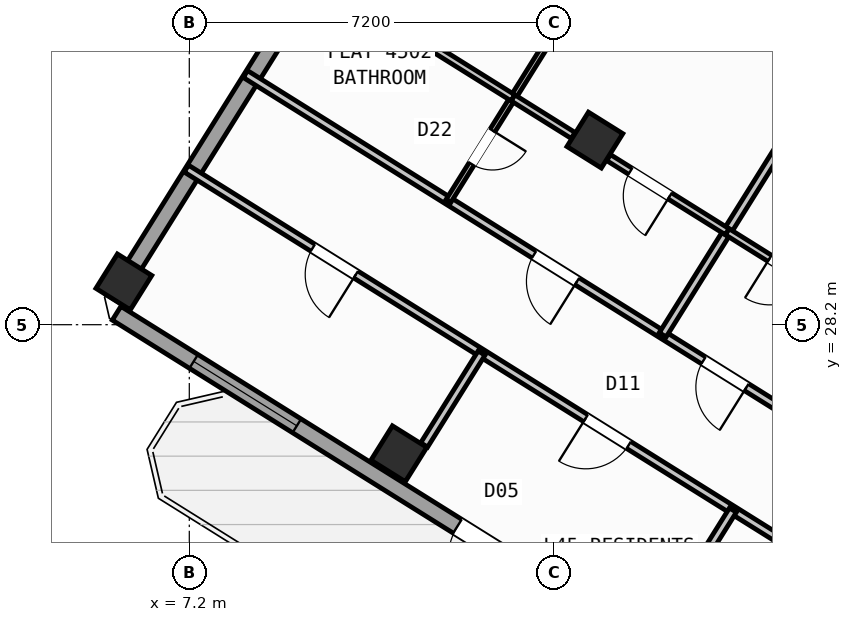
"""IFC4 building model, lengths in metres.
Left out: names, types, materials, properties, quantities, classifications, styles, units other than length and angle.
Written with IfcOpenShell. Run it as: python <this file> out.ifc"""

import sys

from ifc_helpers import new_model, si_unit, direction, frame, frame_2d, origin, origin_2d, place, context, subcontext, project, spatial, rectangle, hollow_rectangle, extrude, source, transform, mapped, element, fill, save


model = new_model("IFC4")
c1 = context("Model", 3, precision=1e-05, world=origin(), true_north=direction((0.0, 1.0)))
c2 = subcontext(c1, "Body", "Model", "MODEL_VIEW")
j1 = project(units=[si_unit("LENGTHUNIT", "METRE"), si_unit("PLANEANGLEUNIT", "RADIAN")], contexts=[c1])
p1 = place(None, origin())
s1 = spatial("IfcSite", under=j1, at=p1, CompositionType="ELEMENT")
p2 = place(p1, origin())
s2 = spatial("IfcBuilding", under=s1, at=p2, CompositionType="ELEMENT")
p3 = place(p2, frame((0.0, 0.0, 179.4)))
s3 = spatial("IfcBuildingStorey", under=s2, at=p3, CompositionType="ELEMENT", Elevation=179.4)
m1 = source(origin(), c2, "Body", "SweptSolid", [
    extrude(hollow_rectangle(XDim=0.8, YDim=0.8, WallThickness=0.032, at=origin_2d()), origin(), (0.0, 0.0, 1.0), 4.8),
])
for number, where, z_axis, x_axis in (
    (1, (15.205, 31.844, 0.0), (0.0, 0.0, 1.0), (-0.848, 0.53, 0.0)),
    (2, (11.336, 25.653, 0.0), (0.0, 0.0, 1.0), (-0.848, 0.53, 0.0)),
    (3, (5.909, 29.044, 0.0), (0.0, 0.0, 1.0), (-0.848, 0.53, 0.0)),
):
    element("IfcColumn", number, at=place(p3, frame(where, z_axis=z_axis, x_axis=x_axis)), inside=s3, PredefinedType="COLUMN", context=c2, shape_type="MappedRepresentation", body=[
        mapped(m1, transform((0.0, 0.0, 0.0), scale=1.0)),
    ])
p4 = place(p3, frame((31.76, 12.183, 0.0), z_axis=(0.0, 0.0, 1.0), x_axis=(-0.848047074256, 0.529920899612, 0.0)))
e4 = element("IfcWall", 4, at=p4, inside=s3, PredefinedType="STANDARD", context=c2, shape_type="SweptSolid", body=[
    extrude(rectangle(XDim=30.652, YDim=0.32, at=frame_2d((15.326, 0.0))), origin(), (0.0, 0.0, 1.0), 4.55),
])
p5 = place(p4, frame((21.52, 0.0, 0.0)))
e5 = element("IfcOpeningElement", 5, at=p5, cuts=e4, PredefinedType="OPENING", context=c2, shape_type="SweptSolid", body=[
    extrude(rectangle(XDim=1.2, YDim=2.15, at=frame_2d((0.6, 1.075))), frame((0.0, 0.17, 0.0), z_axis=(0.0, -1.0, 0.0), x_axis=(1.0, 0.0, 0.0)), (0.0, 0.0, 1.0), 0.34),
])
p6 = place(p4, frame((14.878, 0.0, 0.0)))
e6 = element("IfcOpeningElement", 6, at=p6, cuts=e4, PredefinedType="OPENING", context=c2, shape_type="SweptSolid", body=[
    extrude(rectangle(XDim=1.5, YDim=2.25, at=frame_2d((0.75, 1.125))), frame((0.0, 0.17, 0.0), z_axis=(0.0, -1.0, 0.0), x_axis=(1.0, 0.0, 0.0)), (0.0, 0.0, 1.0), 0.34),
])
p7 = place(p4, frame((1.865, 0.0, 0.75)))
e7 = element("IfcOpeningElement", 7, at=p7, cuts=e4, PredefinedType="OPENING", context=c2, shape_type="SweptSolid", body=[
    extrude(rectangle(XDim=2.4, YDim=1.6, at=frame_2d((1.2, 0.8))), frame((0.0, 0.17, 0.0), z_axis=(0.0, -1.0, 0.0), x_axis=(1.0, 0.0, 0.0)), (0.0, 0.0, 1.0), 0.34),
])
p8 = place(p4, frame((7.094, 0.0, 0.75)))
e8 = element("IfcOpeningElement", 8, at=p8, cuts=e4, PredefinedType="OPENING", context=c2, shape_type="SweptSolid", body=[
    extrude(rectangle(XDim=2.4, YDim=1.6, at=frame_2d((1.2, 0.8))), frame((0.0, 0.17, 0.0), z_axis=(0.0, -1.0, 0.0), x_axis=(1.0, 0.0, 0.0)), (0.0, 0.0, 1.0), 0.34),
])
p9 = place(p4, frame((19.404, 0.0, 0.95)))
e9 = element("IfcOpeningElement", 9, at=p9, cuts=e4, PredefinedType="OPENING", context=c2, shape_type="SweptSolid", body=[
    extrude(rectangle(XDim=1.2, YDim=1.4, at=frame_2d((0.6, 0.7))), frame((0.0, 0.17, 0.0), z_axis=(0.0, -1.0, 0.0), x_axis=(1.0, 0.0, 0.0)), (0.0, 0.0, 1.0), 0.34),
])
p10 = place(p4, frame((26.458, 0.0, 0.75)))
e10 = element("IfcOpeningElement", 10, at=p10, cuts=e4, PredefinedType="OPENING", context=c2, shape_type="SweptSolid", body=[
    extrude(rectangle(XDim=2.4, YDim=1.6, at=frame_2d((1.2, 0.8))), frame((0.0, 0.17, 0.0), z_axis=(0.0, -1.0, 0.0), x_axis=(1.0, 0.0, 0.0)), (0.0, 0.0, 1.0), 0.34),
])
p11 = place(p3, frame((5.7, 28.71, 0.0), z_axis=(0.0, 0.0, 1.0), x_axis=(0.529923711467, 0.8480453172, 0.0)))
e11 = element("IfcWall", 11, at=p11, inside=s3, PredefinedType="STANDARD", context=c2, shape_type="SweptSolid", body=[
    extrude(rectangle(XDim=21.587, YDim=0.32, at=frame_2d((10.794, 0.0))), origin(), (0.0, 0.0, 1.0), 4.025),
])
p12 = place(p11, frame((10.127, 0.0, 0.75)))
e12 = element("IfcOpeningElement", 12, at=p12, cuts=e11, PredefinedType="OPENING", context=c2, shape_type="SweptSolid", body=[
    extrude(rectangle(XDim=2.4, YDim=1.6, at=frame_2d((1.2, 0.8))), frame((0.0, 0.17, 0.0), z_axis=(0.0, -1.0, 0.0), x_axis=(1.0, 0.0, 0.0)), (0.0, 0.0, 1.0), 0.34),
])
p13 = place(p3, frame((17.424, 47.083, 0.0), z_axis=(0.0, 0.0, 1.0), x_axis=(0.848049927979, -0.529916332693, 0.0)))
e13 = element("IfcWall", 13, at=p13, inside=s3, PredefinedType="STANDARD", context=c2, shape_type="SweptSolid", body=[
    extrude(rectangle(XDim=29.223, YDim=0.32, at=frame_2d((14.612, 0.0))), origin(), (0.0, 0.0, 1.0), 4.55),
])
p14 = place(p13, frame((2.745, 0.0, 0.0)))
e14 = element("IfcOpeningElement", 14, at=p14, cuts=e13, PredefinedType="OPENING", context=c2, shape_type="SweptSolid", body=[
    extrude(rectangle(XDim=1.05, YDim=2.15, at=frame_2d((0.525, 1.075))), frame((0.0, 0.17, 0.0), z_axis=(0.0, -1.0, 0.0), x_axis=(1.0, 0.0, 0.0)), (0.0, 0.0, 1.0), 0.34),
])
p15 = place(p13, frame((21.926, 0.0, 0.75)))
e15 = element("IfcOpeningElement", 15, at=p15, cuts=e13, PredefinedType="OPENING", context=c2, shape_type="SweptSolid", body=[
    extrude(rectangle(XDim=2.4, YDim=1.6, at=frame_2d((1.2, 0.8))), frame((0.0, 0.17, 0.0), z_axis=(0.0, -1.0, 0.0), x_axis=(1.0, 0.0, 0.0)), (0.0, 0.0, 1.0), 0.34),
])
p16 = place(p13, frame((26.934, 0.0, 0.95)))
e16 = element("IfcOpeningElement", 16, at=p16, cuts=e13, PredefinedType="OPENING", context=c2, shape_type="SweptSolid", body=[
    extrude(rectangle(XDim=1.2, YDim=1.4, at=frame_2d((0.6, 0.7))), frame((0.0, 0.17, 0.0), z_axis=(0.0, -1.0, 0.0), x_axis=(1.0, 0.0, 0.0)), (0.0, 0.0, 1.0), 0.34),
])
p17 = place(p13, frame((10.057, 0.0, 1.0)))
e17 = element("IfcOpeningElement", 17, at=p17, cuts=e13, PredefinedType="OPENING", context=c2, shape_type="SweptSolid", body=[
    extrude(rectangle(XDim=0.65, YDim=1.15, at=frame_2d((0.325, 0.575))), frame((0.0, 0.17, 0.0), z_axis=(0.0, -1.0, 0.0), x_axis=(1.0, 0.0, 0.0)), (0.0, 0.0, 1.0), 0.34),
])
p18 = place(p13, frame((14.636, 0.0, 1.0)))
e18 = element("IfcOpeningElement", 18, at=p18, cuts=e13, PredefinedType="OPENING", context=c2, shape_type="SweptSolid", body=[
    extrude(rectangle(XDim=0.9, YDim=1.25, at=frame_2d((0.45, 0.625))), frame((0.0, 0.17, 0.0), z_axis=(0.0, -1.0, 0.0), x_axis=(1.0, 0.0, 0.0)), (0.0, 0.0, 1.0), 0.34),
])
p19 = place(p13, frame((8.052, 0.0, 1.0)))
e19 = element("IfcOpeningElement", 19, at=p19, cuts=e13, PredefinedType="OPENING", context=c2, shape_type="SweptSolid", body=[
    extrude(rectangle(XDim=0.65, YDim=1.15, at=frame_2d((0.325, 0.575))), frame((0.0, 0.17, 0.0), z_axis=(0.0, -1.0, 0.0), x_axis=(1.0, 0.0, 0.0)), (0.0, 0.0, 1.0), 0.34),
])
p20 = place(p3, frame((22.495, 24.281, 0.0), z_axis=(0.0, 0.0, 1.0), x_axis=(-0.848052408131, 0.529912363569, 0.0)))
e20 = element("IfcWall", 20, at=p20, inside=s3, PredefinedType="PARTITIONING", context=c2, shape_type="SweptSolid", body=[
    extrude(rectangle(XDim=16.73, YDim=0.16, at=frame_2d((8.365, 0.0))), origin(), (0.0, 0.0, 1.0), 4.54),
])
p21 = place(p20, frame((5.068, 0.0, 0.0)))
e21 = element("IfcOpeningElement", 21, at=p21, cuts=e20, PredefinedType="OPENING", context=c2, shape_type="SweptSolid", body=[
    extrude(rectangle(XDim=1.0, YDim=2.1, at=frame_2d((0.5, 1.05))), frame((0.0, 0.09, 0.0), z_axis=(0.0, -1.0, 0.0), x_axis=(1.0, 0.0, 0.0)), (0.0, 0.0, 1.0), 0.18),
])
p22 = place(p20, frame((9.011, 0.0, 0.0)))
e22 = element("IfcOpeningElement", 22, at=p22, cuts=e20, PredefinedType="OPENING", context=c2, shape_type="SweptSolid", body=[
    extrude(rectangle(XDim=1.0, YDim=2.1, at=frame_2d((0.5, 1.05))), frame((0.0, 0.09, 0.0), z_axis=(0.0, -1.0, 0.0), x_axis=(1.0, 0.0, 0.0)), (0.0, 0.0, 1.0), 0.18),
])
p23 = place(p3, frame((21.329, 22.416, 0.0), z_axis=(0.0, 0.0, 1.0), x_axis=(-0.848052408131, 0.529912363569, 0.0)))
e23 = element("IfcWall", 23, at=p23, inside=s3, PredefinedType="PARTITIONING", context=c2, shape_type="SweptSolid", body=[
    extrude(rectangle(XDim=16.73, YDim=0.16, at=frame_2d((8.365, 0.0))), origin(), (0.0, 0.0, 1.0), 4.54),
])
p24 = place(p23, frame((1.505, 0.0, 0.0)))
e24 = element("IfcOpeningElement", 24, at=p24, cuts=e23, PredefinedType="OPENING", context=c2, shape_type="SweptSolid", body=[
    extrude(rectangle(XDim=1.0, YDim=2.1, at=frame_2d((0.5, 1.05))), frame((0.0, 0.09, 0.0), z_axis=(0.0, -1.0, 0.0), x_axis=(1.0, 0.0, 0.0)), (0.0, 0.0, 1.0), 0.18),
])
p25 = place(p23, frame((6.435, 0.0, 0.0)))
e25 = element("IfcOpeningElement", 25, at=p25, cuts=e23, PredefinedType="OPENING", context=c2, shape_type="SweptSolid", body=[
    extrude(rectangle(XDim=1.0, YDim=2.1, at=frame_2d((0.5, 1.05))), frame((0.0, 0.09, 0.0), z_axis=(0.0, -1.0, 0.0), x_axis=(1.0, 0.0, 0.0)), (0.0, 0.0, 1.0), 0.18),
])
p26 = place(p23, frame((12.784, 0.0, 0.0)))
e26 = element("IfcOpeningElement", 26, at=p26, cuts=e23, PredefinedType="OPENING", context=c2, shape_type="SweptSolid", body=[
    extrude(rectangle(XDim=1.0, YDim=2.1, at=frame_2d((0.5, 1.05))), frame((0.0, 0.09, 0.0), z_axis=(0.0, -1.0, 0.0), x_axis=(1.0, 0.0, 0.0)), (0.0, 0.0, 1.0), 0.18),
])
p27 = place(p3, frame((17.928, 24.541, 0.0), z_axis=(0.0, 0.0, 1.0), x_axis=(-0.529844966244, -0.848094518167, 0.0)))
e27 = element("IfcWall", 27, at=p27, inside=s3, PredefinedType="PARTITIONING", context=c2, shape_type="SweptSolid", body=[
    extrude(rectangle(XDim=2.138, YDim=0.16, at=frame_2d((1.069, 0.0))), origin(), (0.0, 0.0, 1.0), 4.025),
])
p28 = place(p3, frame((12.968, 27.64, 0.0), z_axis=(0.0, 0.0, 1.0), x_axis=(-0.52989628283, -0.848062456098, 0.0)))
e28 = element("IfcWall", 28, at=p28, inside=s3, PredefinedType="PARTITIONING", context=c2, shape_type="SweptSolid", body=[
    extrude(rectangle(XDim=2.138, YDim=0.16, at=frame_2d((1.069, 0.0))), origin(), (0.0, 0.0, 1.0), 4.54),
])
p29 = place(p3, frame((25.351, 42.095, 0.0), z_axis=(0.0, 0.0, 1.0), x_axis=(-0.529926315456, -0.848043690023, 0.0)))
e29 = element("IfcWall", 29, at=p29, inside=s3, PredefinedType="PARTITIONING", context=c2, shape_type="SweptSolid", body=[
    extrude(rectangle(XDim=16.62, YDim=0.16, at=frame_2d((8.31, 0.0))), origin(), (0.0, 0.0, 1.0), 4.54),
])
p30 = place(p3, frame((20.203, 28.543, 0.0), z_axis=(0.0, 0.0, 1.0), x_axis=(-0.848066485351, 0.529889834233, 0.0)))
e30 = element("IfcWall", 30, at=p30, inside=s3, PredefinedType="PLUMBINGWALL", context=c2, shape_type="SweptSolid", body=[
    extrude(rectangle(XDim=2.816, YDim=0.14, at=frame_2d((1.408, 0.0))), origin(), (0.0, 0.0, 1.0), 4.025),
])
p31 = place(p30, frame((0.906, 0.0, 0.0)))
e31 = element("IfcOpeningElement", 31, at=p31, cuts=e30, PredefinedType="OPENING", context=c2, shape_type="SweptSolid", body=[
    extrude(rectangle(XDim=0.92, YDim=2.08, at=frame_2d((0.46, 1.04))), frame((0.0, 0.08, 0.0), z_axis=(0.0, -1.0, 0.0), x_axis=(1.0, 0.0, 0.0)), (0.0, 0.0, 1.0), 0.16),
])
p32 = place(p3, frame((21.202, 44.864, 0.0), z_axis=(0.0, 0.0, 1.0), x_axis=(-0.529920421309, -0.848047373134, 0.0)))
e32 = element("IfcWall", 32, at=p32, inside=s3, PredefinedType="PARTITIONING", context=c2, shape_type="SweptSolid", body=[
    extrude(rectangle(XDim=16.77, YDim=0.11, at=frame_2d((8.385, 0.0))), origin(), (0.0, 0.0, 1.0), 4.54),
])
p33 = place(p32, frame((15.13, 0.0, 0.0)))
e33 = element("IfcOpeningElement", 33, at=p33, cuts=e32, PredefinedType="OPENING", context=c2, shape_type="SweptSolid", body=[
    extrude(rectangle(XDim=0.78, YDim=2.05, at=frame_2d((0.39, 1.025))), frame((0.0, 0.065, 0.0), z_axis=(0.0, -1.0, 0.0), x_axis=(1.0, 0.0, 0.0)), (0.0, 0.0, 1.0), 0.13),
])
p34 = place(p32, frame((9.884, 0.0, 0.0)))
e34 = element("IfcOpeningElement", 34, at=p34, cuts=e32, PredefinedType="OPENING", context=c2, shape_type="SweptSolid", body=[
    extrude(rectangle(XDim=0.92, YDim=2.08, at=frame_2d((0.46, 1.04))), frame((0.0, 0.065, 0.0), z_axis=(0.0, -1.0, 0.0), x_axis=(1.0, 0.0, 0.0)), (0.0, 0.0, 1.0), 0.13),
])
p35 = place(p3, frame((17.815, 30.035, 0.0), z_axis=(0.0, 0.0, 1.0), x_axis=(-0.848033088468, 0.529943280798, 0.0)))
e35 = element("IfcWall", 35, at=p35, inside=s3, PredefinedType="PLUMBINGWALL", context=c2, shape_type="SweptSolid", body=[
    extrude(rectangle(XDim=2.76, YDim=0.14, at=frame_2d((1.38, 0.0))), origin(), (0.0, 0.0, 1.0), 4.025),
])
p36 = place(p35, frame((1.333, 0.0, 0.0)))
e36 = element("IfcOpeningElement", 36, at=p36, cuts=e35, PredefinedType="OPENING", context=c2, shape_type="SweptSolid", body=[
    extrude(rectangle(XDim=0.92, YDim=2.08, at=frame_2d((0.46, 1.04))), frame((0.0, 0.08, 0.0), z_axis=(0.0, -1.0, 0.0), x_axis=(1.0, 0.0, 0.0)), (0.0, 0.0, 1.0), 0.16),
])
p37 = place(p3, frame((14.776, 31.935, 0.0), z_axis=(0.0, 0.0, 1.0), x_axis=(-0.847978739052, 0.530030242643, 0.0)))
e37 = element("IfcWall", 37, at=p37, inside=s3, PredefinedType="PLUMBINGWALL", context=c2, shape_type="SweptSolid", body=[
    extrude(rectangle(XDim=1.402, YDim=0.14, at=frame_2d((0.701, 0.0))), origin(), (0.0, 0.0, 1.0), 4.025),
])
p38 = place(p3, frame((13.587, 32.678, 0.0), z_axis=(0.0, 0.0, 1.0), x_axis=(-0.848073874788, 0.529878007566, 0.0)))
e38 = element("IfcWall", 38, at=p38, inside=s3, PredefinedType="PLUMBINGWALL", context=c2, shape_type="SweptSolid", body=[
    extrude(rectangle(XDim=4.174, YDim=0.14, at=frame_2d((2.087, 0.0))), origin(), (0.0, 0.0, 1.0), 4.025),
])
m2 = source(origin(), c2, "Body", "SweptSolid", [
    extrude(rectangle(XDim=1.2, YDim=2.15, at=frame_2d((0.6, 1.075))), frame((0.0, 0.025, 0.0), z_axis=(0.0, -1.0, 0.0), x_axis=(1.0, 0.0, 0.0)), (0.0, 0.0, 1.0), 0.05),
])
p39 = place(p5, origin())
e39 = element("IfcDoor", 39, at=p39, inside=s3, OperationType="SINGLE_SWING_LEFT", PredefinedType="DOOR", context=c2, shape_type="MappedRepresentation", body=[
    mapped(m2, transform((0.0, 0.0, 0.0), scale=1.0)),
])
fill(e5, e39)
m3 = source(origin(), c2, "Body", "SweptSolid", [
    extrude(rectangle(XDim=2.4, YDim=1.6, at=frame_2d((1.2, 0.8))), frame((0.0, 0.03, 0.0), z_axis=(0.0, -1.0, 0.0), x_axis=(1.0, 0.0, 0.0)), (0.0, 0.0, 1.0), 0.06),
])
p40 = place(p10, origin())
e40 = element("IfcWindow", 40, at=p40, inside=s3, PartitioningType="SINGLE_PANEL", PredefinedType="WINDOW", context=c2, shape_type="MappedRepresentation", body=[
    mapped(m3, transform((0.0, 0.0, 0.0), scale=1.0)),
])
fill(e10, e40)
m4 = source(origin(), c2, "Body", "SweptSolid", [
    extrude(rectangle(XDim=1.0, YDim=2.1, at=frame_2d((0.5, 1.05))), frame((0.0, 0.025, 0.0), z_axis=(0.0, -1.0, 0.0), x_axis=(1.0, 0.0, 0.0)), (0.0, 0.0, 1.0), 0.05),
])
p41 = place(p25, origin())
e41 = element("IfcDoor", 41, at=p41, inside=s3, OperationType="SINGLE_SWING_RIGHT", PredefinedType="DOOR", context=c2, shape_type="MappedRepresentation", body=[
    mapped(m4, transform((0.0, 0.0, 0.0), scale=1.0)),
])
fill(e25, e41)
p42 = place(p26, origin())
e42 = element("IfcDoor", 42, at=p42, inside=s3, OperationType="SINGLE_SWING_LEFT", PredefinedType="DOOR", context=c2, shape_type="MappedRepresentation", body=[
    mapped(m4, transform((0.0, 0.0, 0.0), scale=1.0)),
])
fill(e26, e42)
p43 = place(p21, origin())
e43 = element("IfcDoor", 43, at=p43, inside=s3, OperationType="SINGLE_SWING_LEFT", PredefinedType="DOOR", context=c2, shape_type="MappedRepresentation", body=[
    mapped(m4, transform((0.0, 0.0, 0.0), scale=1.0)),
])
fill(e21, e43)
m5 = source(origin(), c2, "Body", "SweptSolid", [
    extrude(rectangle(XDim=0.92, YDim=2.08, at=frame_2d((0.46, 1.04))), frame((0.0, 0.025, 0.0), z_axis=(0.0, -1.0, 0.0), x_axis=(1.0, 0.0, 0.0)), (0.0, 0.0, 1.0), 0.05),
])
p44 = place(p31, origin())
e44 = element("IfcDoor", 44, at=p44, inside=s3, OperationType="SINGLE_SWING_RIGHT", PredefinedType="DOOR", context=c2, shape_type="MappedRepresentation", body=[
    mapped(m5, transform((0.0, 0.0, 0.0), scale=1.0)),
])
fill(e31, e44)
p45 = place(p22, origin())
e45 = element("IfcDoor", 45, at=p45, inside=s3, OperationType="SINGLE_SWING_LEFT", PredefinedType="DOOR", context=c2, shape_type="MappedRepresentation", body=[
    mapped(m4, transform((0.0, 0.0, 0.0), scale=1.0)),
])
fill(e22, e45)
p46 = place(p36, origin())
e46 = element("IfcDoor", 46, at=p46, inside=s3, OperationType="SINGLE_SWING_LEFT", PredefinedType="DOOR", context=c2, shape_type="MappedRepresentation", body=[
    mapped(m5, transform((0.0, 0.0, 0.0), scale=1.0)),
])
fill(e36, e46)
m6 = source(origin(), c2, "Body", "SweptSolid", [
    extrude(rectangle(XDim=0.78, YDim=2.05, at=frame_2d((0.39, 1.025))), frame((0.0, 0.025, 0.0), z_axis=(0.0, -1.0, 0.0), x_axis=(1.0, 0.0, 0.0)), (0.0, 0.0, 1.0), 0.05),
])
p47 = place(p33, origin())
e47 = element("IfcDoor", 47, at=p47, inside=s3, OperationType="SINGLE_SWING_LEFT", PredefinedType="DOOR", context=c2, shape_type="MappedRepresentation", body=[
    mapped(m6, transform((0.0, 0.0, 0.0), scale=1.0)),
])
fill(e33, e47)
save(model, sys.argv[1])
